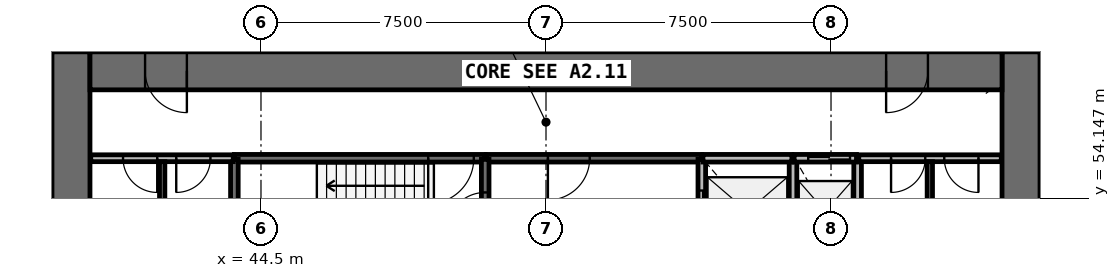
"""IFC4 building model, lengths in metres.
Left out: names, types, materials, properties, quantities, classifications, styles, units other than length and angle.
Written with IfcOpenShell. Run it as: python <this file> out.ifc"""

import sys

from ifc_helpers import new_model, si_unit, direction, frame, frame_2d, origin, place, context, subcontext, project, spatial, rectangle, extrude, source, transform, mapped, element, fill, save


model = new_model("IFC4")
c1 = context("Model", 3, precision=1e-05, world=origin(), true_north=direction((0.0, 1.0)))
c2 = subcontext(c1, "Body", "Model", "MODEL_VIEW")
j1 = project(units=[si_unit("LENGTHUNIT", "METRE"), si_unit("PLANEANGLEUNIT", "RADIAN")], contexts=[c1])
p1 = place(None, origin())
s1 = spatial("IfcSite", under=j1, at=p1, CompositionType="ELEMENT")
p2 = place(p1, origin())
s2 = spatial("IfcBuilding", under=s1, at=p2, CompositionType="ELEMENT")
p3 = place(p2, frame((0.0, 0.0, 44.6)))
s3 = spatial("IfcBuildingStorey", under=s2, at=p3, CompositionType="ELEMENT", Elevation=44.6)
p4 = place(p3, frame((64.5, 38.0, 0.0), z_axis=(0.0, 0.0, 1.0), x_axis=(0.0, 1.0, 0.0)))
e1 = element("IfcWall", 1, at=p4, inside=s3, PredefinedType="SHEAR", context=c2, shape_type="SweptSolid", body=[
    extrude(rectangle(XDim=20.0, YDim=1.0, at=frame_2d((10.0, 0.0))), origin(), (0.0, 0.0, 1.0), 4.4),
])
p5 = place(p4, frame((9.1, 0.0, 0.0)))
e2 = element("IfcOpeningElement", 2, at=p5, cuts=e1, PredefinedType="OPENING", context=c2, shape_type="SweptSolid", body=[
    extrude(rectangle(XDim=1.8, YDim=2.1, at=frame_2d((0.9, 1.05))), frame((0.0, 0.51, 0.0), z_axis=(0.0, -1.0, 0.0), x_axis=(1.0, 0.0, 0.0)), (0.0, 0.0, 1.0), 1.02),
])
p6 = place(p3, frame((39.5, 58.0, 0.0), z_axis=(0.0, 0.0, 1.0), x_axis=(0.0, -1.0, 0.0)))
e3 = element("IfcWall", 3, at=p6, inside=s3, PredefinedType="SHEAR", context=c2, shape_type="SweptSolid", body=[
    extrude(rectangle(XDim=20.0, YDim=1.0, at=frame_2d((10.0, 0.0))), origin(), (0.0, 0.0, 1.0), 4.4),
])
p7 = place(p6, frame((9.1, 0.0, 0.0)))
e4 = element("IfcOpeningElement", 4, at=p7, cuts=e3, PredefinedType="OPENING", context=c2, shape_type="SweptSolid", body=[
    extrude(rectangle(XDim=1.8, YDim=2.1, at=frame_2d((0.9, 1.05))), frame((0.0, 0.51, 0.0), z_axis=(0.0, -1.0, 0.0), x_axis=(1.0, 0.0, 0.0)), (0.0, 0.0, 1.0), 1.02),
])
p8 = place(p3, frame((64.0, 57.5, 0.0), z_axis=(0.0, 0.0, 1.0), x_axis=(-1.0, 0.0, 0.0)))
e5 = element("IfcWall", 5, at=p8, inside=s3, PredefinedType="SHEAR", context=c2, shape_type="SweptSolid", body=[
    extrude(rectangle(XDim=24.0, YDim=1.0, at=frame_2d((12.0, 0.0))), origin(), (0.0, 0.0, 1.0), 4.4),
])
p9 = place(p8, frame((21.45, 0.0, 0.0)))
e6 = element("IfcOpeningElement", 6, at=p9, cuts=e5, PredefinedType="OPENING", context=c2, shape_type="SweptSolid", body=[
    extrude(rectangle(XDim=1.1, YDim=2.1, at=frame_2d((0.55, 1.05))), frame((0.0, 0.51, 0.0), z_axis=(0.0, -1.0, 0.0), x_axis=(1.0, 0.0, 0.0)), (0.0, 0.0, 1.0), 1.02),
])
p10 = place(p8, frame((1.95, 0.0, 0.0)))
e7 = element("IfcOpeningElement", 7, at=p10, cuts=e5, PredefinedType="OPENING", context=c2, shape_type="SweptSolid", body=[
    extrude(rectangle(XDim=1.1, YDim=2.1, at=frame_2d((0.55, 1.05))), frame((0.0, 0.51, 0.0), z_axis=(0.0, -1.0, 0.0), x_axis=(1.0, 0.0, 0.0)), (0.0, 0.0, 1.0), 1.02),
])
p11 = place(p3, frame((50.4, 55.2, 0.0), z_axis=(0.0, 0.0, 1.0), x_axis=(-1.0, 0.0, 0.0)))
e8 = element("IfcWall", 8, at=p11, inside=s3, PredefinedType="SOLIDWALL", context=c2, shape_type="SweptSolid", body=[
    extrude(rectangle(XDim=6.6, YDim=0.2, at=frame_2d((3.3, 0.0))), origin(), (0.0, 0.0, 1.0), 3.95),
])
p12 = place(p11, frame((0.3, 0.0, 0.0)))
e9 = element("IfcOpeningElement", 9, at=p12, cuts=e8, PredefinedType="OPENING", context=c2, shape_type="SweptSolid", body=[
    extrude(rectangle(XDim=1.2, YDim=2.1, at=frame_2d((0.6, 1.05))), frame((0.0, 0.11, 0.0), z_axis=(0.0, -1.0, 0.0), x_axis=(1.0, 0.0, 0.0)), (0.0, 0.0, 1.0), 0.22),
])
p13 = place(p3, frame((56.1, 55.2, 0.0), z_axis=(0.0, 0.0, 1.0), x_axis=(-1.0, 0.0, 0.0)))
e10 = element("IfcWall", 10, at=p13, inside=s3, PredefinedType="SOLIDWALL", context=c2, shape_type="SweptSolid", body=[
    extrude(rectangle(XDim=5.67, YDim=0.2, at=frame_2d((2.835, 0.0))), origin(), (0.0, 0.0, 1.0), 3.95),
])
p14 = place(p13, frame((2.95, 0.0, 0.0)))
e11 = element("IfcOpeningElement", 11, at=p14, cuts=e10, PredefinedType="OPENING", context=c2, shape_type="SweptSolid", body=[
    extrude(rectangle(XDim=1.1, YDim=2.1, at=frame_2d((0.55, 1.05))), frame((0.0, 0.11, 0.0), z_axis=(0.0, -1.0, 0.0), x_axis=(1.0, 0.0, 0.0)), (0.0, 0.0, 1.0), 0.22),
])
p15 = place(p3, frame((50.4, 52.4, 0.0), z_axis=(0.0, 0.0, 1.0), x_axis=(0.0, 1.0, 0.0)))
e12 = element("IfcWall", 12, at=p15, inside=s3, PredefinedType="SOLIDWALL", context=c2, shape_type="SweptSolid", body=[
    extrude(rectangle(XDim=2.77, YDim=0.2, at=frame_2d((1.385, 0.0))), origin(), (0.0, 0.0, 1.0), 3.95),
])
p16 = place(p15, frame((0.9, 0.0, 0.0)))
e13 = element("IfcOpeningElement", 13, at=p16, cuts=e12, PredefinedType="OPENING", context=c2, shape_type="SweptSolid", body=[
    extrude(rectangle(XDim=1.0, YDim=2.1, at=frame_2d((0.5, 1.05))), frame((0.0, 0.11, 0.0), z_axis=(0.0, -1.0, 0.0), x_axis=(1.0, 0.0, 0.0)), (0.0, 0.0, 1.0), 0.22),
])
p17 = place(p3, frame((56.1, 55.17, 0.0), z_axis=(0.0, 0.0, 1.0), x_axis=(0.0, -1.0, 0.0)))
e14 = element("IfcWall", 14, at=p17, inside=s3, PredefinedType="SOLIDWALL", context=c2, shape_type="SweptSolid", body=[
    extrude(rectangle(XDim=2.77, YDim=0.2, at=frame_2d((1.385, 0.0))), origin(), (0.0, 0.0, 1.0), 3.95),
])
p18 = place(p17, frame((0.82, 0.0, 0.0)))
e15 = element("IfcOpeningElement", 15, at=p18, cuts=e14, PredefinedType="OPENING", context=c2, shape_type="SweptSolid", body=[
    extrude(rectangle(XDim=1.1, YDim=2.1, at=frame_2d((0.55, 1.05))), frame((0.0, 0.11, 0.0), z_axis=(0.0, -1.0, 0.0), x_axis=(1.0, 0.0, 0.0)), (0.0, 0.0, 1.0), 0.22),
])
for number, where, z_axis, x_axis in (
    (16, (58.5, 52.4, 0.0), (0.0, 0.0, 1.0), (0.0, 1.0, 0.0)),
    (17, (60.2, 52.4, 0.0), (0.0, 0.0, 1.0), (0.0, 1.0, 0.0)),
):
    element("IfcWall", number, at=place(p3, frame(where, z_axis=z_axis, x_axis=x_axis)), inside=s3, PredefinedType="SOLIDWALL", context=c2, shape_type="SweptSolid", body=[
        extrude(rectangle(XDim=2.8, YDim=0.2, at=frame_2d((1.4, 0.0))), origin(), (0.0, 0.0, 1.0), 3.95),
    ])
p19 = place(p3, frame((58.47, 55.2, 0.0), z_axis=(0.0, 0.0, 1.0), x_axis=(-1.0, 0.0, 0.0)))
e18 = element("IfcWall", 18, at=p19, inside=s3, PredefinedType="SOLIDWALL", context=c2, shape_type="SweptSolid", body=[
    extrude(rectangle(XDim=2.34, YDim=0.2, at=frame_2d((1.17, 0.0))), origin(), (0.0, 0.0, 1.0), 3.95),
])
p20 = place(p3, frame((43.8, 55.17, 0.0), z_axis=(0.0, 0.0, 1.0), x_axis=(0.0, -1.0, 0.0)))
e19 = element("IfcWall", 19, at=p20, inside=s3, PredefinedType="SOLIDWALL", context=c2, shape_type="SweptSolid", body=[
    extrude(rectangle(XDim=2.14, YDim=0.2, at=frame_2d((1.07, 0.0))), origin(), (0.0, 0.0, 1.0), 3.95),
])
p21 = place(p3, frame((60.17, 55.2, 0.0), z_axis=(0.0, 0.0, 1.0), x_axis=(-1.0, 0.0, 0.0)))
e20 = element("IfcWall", 20, at=p21, inside=s3, PredefinedType="SOLIDWALL", context=c2, shape_type="SweptSolid", body=[
    extrude(rectangle(XDim=1.64, YDim=0.2, at=frame_2d((0.82, 0.0))), origin(), (0.0, 0.0, 1.0), 3.95),
])
p22 = place(p21, frame((0.17, 0.0, 0.0)))
e21 = element("IfcOpeningElement", 21, at=p22, cuts=e20, PredefinedType="OPENING", context=c2, shape_type="SweptSolid", body=[
    extrude(rectangle(XDim=1.1, YDim=2.1, at=frame_2d((0.55, 1.05))), frame((0.0, 0.11, 0.0), z_axis=(0.0, -1.0, 0.0), x_axis=(1.0, 0.0, 0.0)), (0.0, 0.0, 1.0), 0.22),
])
p23 = place(p3, frame((43.77, 55.2, 0.0), z_axis=(0.0, 0.0, 1.0), x_axis=(-1.0, 0.0, 0.0)))
e22 = element("IfcWall", 22, at=p23, inside=s3, PredefinedType="PARTITIONING", context=c2, shape_type="SweptSolid", body=[
    extrude(rectangle(XDim=3.75, YDim=0.18, at=frame_2d((1.875, 0.0))), origin(), (0.0, 0.0, 1.0), 3.95),
])
p24 = place(p23, frame((2.0, 0.0, 0.0)))
e23 = element("IfcOpeningElement", 23, at=p24, cuts=e22, PredefinedType="OPENING", context=c2, shape_type="SweptSolid", body=[
    extrude(rectangle(XDim=0.9, YDim=2.1, at=frame_2d((0.45, 1.05))), frame((0.0, 0.1, 0.0), z_axis=(0.0, -1.0, 0.0), x_axis=(1.0, 0.0, 0.0)), (0.0, 0.0, 1.0), 0.2),
])
p25 = place(p23, frame((0.6, 0.0, 0.0)))
e24 = element("IfcOpeningElement", 24, at=p25, cuts=e22, PredefinedType="OPENING", context=c2, shape_type="SweptSolid", body=[
    extrude(rectangle(XDim=0.9, YDim=2.1, at=frame_2d((0.45, 1.05))), frame((0.0, 0.1, 0.0), z_axis=(0.0, -1.0, 0.0), x_axis=(1.0, 0.0, 0.0)), (0.0, 0.0, 1.0), 0.2),
])
p26 = place(p3, frame((63.98, 55.2, 0.0), z_axis=(0.0, 0.0, 1.0), x_axis=(-1.0, 0.0, 0.0)))
e25 = element("IfcWall", 25, at=p26, inside=s3, PredefinedType="PARTITIONING", context=c2, shape_type="SweptSolid", body=[
    extrude(rectangle(XDim=3.75, YDim=0.18, at=frame_2d((1.875, 0.0))), origin(), (0.0, 0.0, 1.0), 3.95),
])
p27 = place(p26, frame((2.0, 0.0, 0.0)))
e26 = element("IfcOpeningElement", 26, at=p27, cuts=e25, PredefinedType="OPENING", context=c2, shape_type="SweptSolid", body=[
    extrude(rectangle(XDim=0.9, YDim=2.1, at=frame_2d((0.45, 1.05))), frame((0.0, 0.1, 0.0), z_axis=(0.0, -1.0, 0.0), x_axis=(1.0, 0.0, 0.0)), (0.0, 0.0, 1.0), 0.2),
])
p28 = place(p26, frame((0.6, 0.0, 0.0)))
e27 = element("IfcOpeningElement", 27, at=p28, cuts=e25, PredefinedType="OPENING", context=c2, shape_type="SweptSolid", body=[
    extrude(rectangle(XDim=0.9, YDim=2.1, at=frame_2d((0.45, 1.05))), frame((0.0, 0.1, 0.0), z_axis=(0.0, -1.0, 0.0), x_axis=(1.0, 0.0, 0.0)), (0.0, 0.0, 1.0), 0.2),
])
p29 = place(p3, frame((62.1, 52.4, 0.0), z_axis=(0.0, 0.0, 1.0), x_axis=(0.0, 1.0, 0.0)))
e28 = element("IfcWall", 28, at=p29, inside=s3, PredefinedType="PARTITIONING", context=c2, shape_type="SweptSolid", body=[
    extrude(rectangle(XDim=2.71, YDim=0.14, at=frame_2d((1.355, 0.0))), origin(), (0.0, 0.0, 1.0), 3.05),
])
p30 = place(p3, frame((41.9, 53.1, 0.0), z_axis=(0.0, 0.0, 1.0), x_axis=(0.0, 1.0, 0.0)))
e29 = element("IfcWall", 29, at=p30, inside=s3, PredefinedType="PARTITIONING", context=c2, shape_type="SweptSolid", body=[
    extrude(rectangle(XDim=2.01, YDim=0.14, at=frame_2d((1.005, 0.0))), origin(), (0.0, 0.0, 1.0), 3.05),
])
m1 = source(origin(), c2, "Body", "SweptSolid", [
    extrude(rectangle(XDim=1.1, YDim=2.1, at=frame_2d((0.55, 1.05))), frame((0.0, 0.025, 0.0), z_axis=(0.0, -1.0, 0.0), x_axis=(1.0, 0.0, 0.0)), (0.0, 0.0, 1.0), 0.05),
])
p31 = place(p18, origin())
e30 = element("IfcDoor", 30, at=p31, inside=s3, OperationType="DOUBLE_DOOR_SLIDING", PredefinedType="USERDEFINED", context=c2, shape_type="MappedRepresentation", body=[
    mapped(m1, transform((0.0, 0.0, 0.0), scale=1.0)),
])
fill(e15, e30)
p32 = place(p22, origin())
e31 = element("IfcDoor", 31, at=p32, inside=s3, OperationType="DOUBLE_DOOR_SLIDING", PredefinedType="USERDEFINED", context=c2, shape_type="MappedRepresentation", body=[
    mapped(m1, transform((0.0, 0.0, 0.0), scale=1.0)),
])
fill(e21, e31)
m2 = source(origin(), c2, "Body", "SweptSolid", [
    extrude(rectangle(XDim=1.2, YDim=2.1, at=frame_2d((0.6, 1.05))), frame((0.0, 0.025, 0.0), z_axis=(0.0, -1.0, 0.0), x_axis=(1.0, 0.0, 0.0)), (0.0, 0.0, 1.0), 0.05),
])
p33 = place(p12, origin())
e32 = element("IfcDoor", 32, at=p33, inside=s3, OperationType="SINGLE_SWING_RIGHT", PredefinedType="DOOR", context=c2, shape_type="MappedRepresentation", body=[
    mapped(m2, transform((0.0, 0.0, 0.0), scale=1.0)),
])
fill(e9, e32)
m3 = source(origin(), c2, "Body", "SweptSolid", [
    extrude(rectangle(XDim=1.0, YDim=2.1, at=frame_2d((0.5, 1.05))), frame((0.0, 0.025, 0.0), z_axis=(0.0, -1.0, 0.0), x_axis=(1.0, 0.0, 0.0)), (0.0, 0.0, 1.0), 0.05),
])
p34 = place(p16, origin())
e33 = element("IfcDoor", 33, at=p34, inside=s3, OperationType="SINGLE_SWING_LEFT", PredefinedType="DOOR", context=c2, shape_type="MappedRepresentation", body=[
    mapped(m3, transform((0.0, 0.0, 0.0), scale=1.0)),
])
fill(e13, e33)
m4 = source(origin(), c2, "Body", "SweptSolid", [
    extrude(rectangle(XDim=1.1, YDim=2.1, at=frame_2d((0.55, 1.05))), frame((0.0, 0.025, 0.0), z_axis=(0.0, -1.0, 0.0), x_axis=(1.0, 0.0, 0.0)), (0.0, 0.0, 1.0), 0.05),
])
p35 = place(p14, origin())
e34 = element("IfcDoor", 34, at=p35, inside=s3, OperationType="SINGLE_SWING_RIGHT", PredefinedType="DOOR", context=c2, shape_type="MappedRepresentation", body=[
    mapped(m4, transform((0.0, 0.0, 0.0), scale=1.0)),
])
fill(e11, e34)
m5 = source(origin(), c2, "Body", "SweptSolid", [
    extrude(rectangle(XDim=1.1, YDim=2.1, at=frame_2d((0.55, 1.05))), frame((0.0, 0.025, 0.0), z_axis=(0.0, -1.0, 0.0), x_axis=(1.0, 0.0, 0.0)), (0.0, 0.0, 1.0), 0.05),
])
p36 = place(p9, origin())
e35 = element("IfcDoor", 35, at=p36, inside=s3, OperationType="SINGLE_SWING_LEFT", PredefinedType="DOOR", context=c2, shape_type="MappedRepresentation", body=[
    mapped(m5, transform((0.0, 0.0, 0.0), scale=1.0)),
])
fill(e6, e35)
p37 = place(p10, origin())
e36 = element("IfcDoor", 36, at=p37, inside=s3, OperationType="SINGLE_SWING_RIGHT", PredefinedType="DOOR", context=c2, shape_type="MappedRepresentation", body=[
    mapped(m5, transform((0.0, 0.0, 0.0), scale=1.0)),
])
fill(e7, e36)
m6 = source(origin(), c2, "Body", "SweptSolid", [
    extrude(rectangle(XDim=0.9, YDim=2.1, at=frame_2d((0.45, 1.05))), frame((0.0, 0.025, 0.0), z_axis=(0.0, -1.0, 0.0), x_axis=(1.0, 0.0, 0.0)), (0.0, 0.0, 1.0), 0.05),
])
p38 = place(p24, origin())
e37 = element("IfcDoor", 37, at=p38, inside=s3, OperationType="SINGLE_SWING_LEFT", PredefinedType="DOOR", context=c2, shape_type="MappedRepresentation", body=[
    mapped(m6, transform((0.0, 0.0, 0.0), scale=1.0)),
])
fill(e23, e37)
p39 = place(p25, origin())
e38 = element("IfcDoor", 38, at=p39, inside=s3, OperationType="SINGLE_SWING_RIGHT", PredefinedType="DOOR", context=c2, shape_type="MappedRepresentation", body=[
    mapped(m6, transform((0.0, 0.0, 0.0), scale=1.0)),
])
fill(e24, e38)
p40 = place(p27, origin())
e39 = element("IfcDoor", 39, at=p40, inside=s3, OperationType="SINGLE_SWING_RIGHT", PredefinedType="DOOR", context=c2, shape_type="MappedRepresentation", body=[
    mapped(m6, transform((0.0, 0.0, 0.0), scale=1.0)),
])
fill(e26, e39)
p41 = place(p28, origin())
e40 = element("IfcDoor", 40, at=p41, inside=s3, OperationType="SINGLE_SWING_LEFT", PredefinedType="DOOR", context=c2, shape_type="MappedRepresentation", body=[
    mapped(m6, transform((0.0, 0.0, 0.0), scale=1.0)),
])
fill(e27, e40)
save(model, sys.argv[1])
